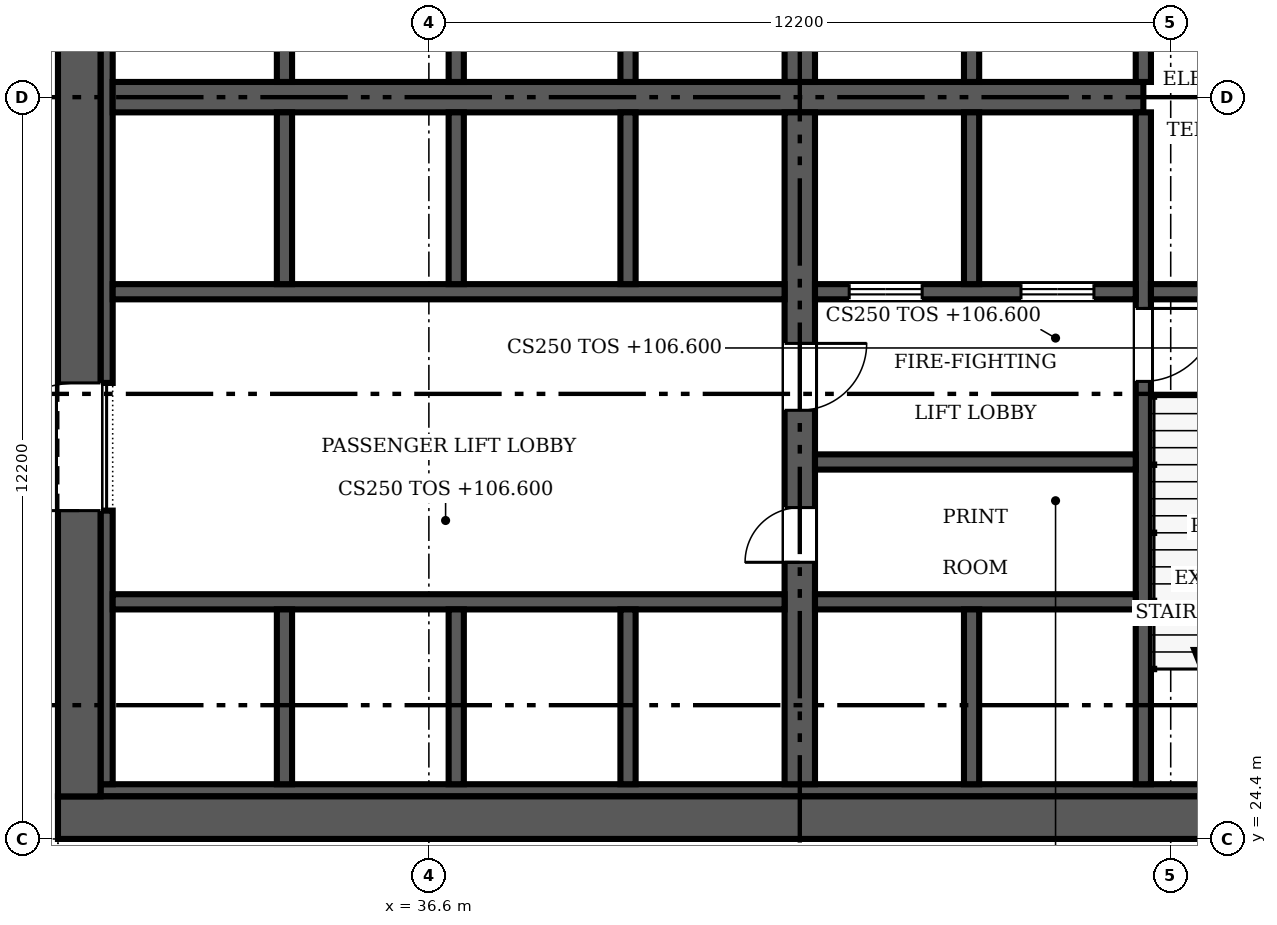
"""IFC4 building model, lengths in metres.
Left out: names, types, materials, properties, quantities, classifications, styles, units other than length and angle.
Written with IfcOpenShell. Run it as: python <this file> out.ifc"""

import sys

from ifc_helpers import new_model, si_unit, direction, frame, frame_2d, origin, place, context, subcontext, project, spatial, rectangle, extrude, source, transform, mapped, element, fill, save


model = new_model("IFC4")
c1 = context("Model", 3, precision=1e-05, world=origin(), true_north=direction((0.0, 1.0)))
c2 = subcontext(c1, "Body", "Model", "MODEL_VIEW")
j1 = project(units=[si_unit("LENGTHUNIT", "METRE"), si_unit("PLANEANGLEUNIT", "RADIAN")], contexts=[c1])
p1 = place(None, origin())
s1 = spatial("IfcSite", under=j1, at=p1, CompositionType="ELEMENT")
p2 = place(p1, origin())
s2 = spatial("IfcBuilding", under=s1, at=p2, CompositionType="ELEMENT")
p3 = place(p2, frame((0.0, 0.0, 106.6)))
s3 = spatial("IfcBuildingStorey", under=s2, at=p3, CompositionType="ELEMENT", Elevation=106.6)
p4 = place(p3, frame((54.9, 24.75, 0.0), z_axis=(0.0, 0.0, 1.0), x_axis=(-1.0, 0.0, 0.0)))
e1 = element("IfcWall", 1, at=p4, inside=s3, PredefinedType="SHEAR", context=c2, shape_type="SweptSolid", body=[
    extrude(rectangle(XDim=24.4, YDim=0.7, at=frame_2d((12.2, 0.0))), origin(), (0.0, 0.0, 1.0), 6.0),
])
m1 = source(origin(), c2, "Body", "SweptSolid", [
    extrude(rectangle(XDim=1.2, YDim=2.1, at=frame_2d((0.6, 1.05))), frame((0.0, 0.36, 0.0), z_axis=(0.0, -1.0, 0.0), x_axis=(1.0, 0.0, 0.0)), (0.0, 0.0, 1.0), 0.72),
])
p5 = place(p4, frame((1.5, 0.0, 0.0)))
e2 = element("IfcOpeningElement", 2, at=p5, cuts=e1, PredefinedType="OPENING", context=c2, shape_type="MappedRepresentation", body=[
    mapped(m1, transform((0.0, 0.0, 0.0), scale=1.0)),
])
p6 = place(p3, frame((30.85, 25.1, 0.0), z_axis=(0.0, 0.0, 1.0), x_axis=(0.0, 1.0, 0.0)))
e3 = element("IfcWall", 3, at=p6, inside=s3, PredefinedType="SHEAR", context=c2, shape_type="SweptSolid", body=[
    extrude(rectangle(XDim=23.0, YDim=0.7, at=frame_2d((11.5, 0.0))), origin(), (0.0, 0.0, 1.0), 6.0),
])
m2 = source(origin(), c2, "Body", "SweptSolid", [
    extrude(rectangle(XDim=2.1, YDim=2.4, at=frame_2d((1.05, 1.2))), frame((0.0, 0.36, 0.0), z_axis=(0.0, -1.0, 0.0), x_axis=(1.0, 0.0, 0.0)), (0.0, 0.0, 1.0), 0.72),
])
p7 = place(p6, frame((4.7, 0.0, 0.0)))
e4 = element("IfcOpeningElement", 4, at=p7, cuts=e3, PredefinedType="OPENING", context=c2, shape_type="MappedRepresentation", body=[
    mapped(m2, transform((0.0, 0.0, 0.0), scale=1.0)),
])
p8 = place(p6, frame((16.2, 0.0, 0.0)))
e5 = element("IfcOpeningElement", 5, at=p8, cuts=e3, PredefinedType="OPENING", context=c2, shape_type="MappedRepresentation", body=[
    mapped(m2, transform((0.0, 0.0, 0.0), scale=1.0)),
])
p9 = place(p3, frame((31.2, 25.2, 0.0), z_axis=(0.0, 0.0, 1.0), x_axis=(1.0, 0.0, 0.0)))
e6 = element("IfcWall", 6, at=p9, inside=s3, PredefinedType="SOLIDWALL", context=c2, shape_type="SweptSolid", body=[
    extrude(rectangle(XDim=21.0, YDim=0.2, at=frame_2d((10.5, 0.0))), origin(), (0.0, 0.0, 1.0), 6.0),
])
p10 = place(p3, frame((31.3, 25.3, 0.0), z_axis=(0.0, 0.0, 1.0), x_axis=(0.0, 1.0, 0.0)))
e7 = element("IfcWall", 7, at=p10, inside=s3, PredefinedType="SOLIDWALL", context=c2, shape_type="SweptSolid", body=[
    extrude(rectangle(XDim=4.5, YDim=0.2, at=frame_2d((2.25, 0.0))), origin(), (0.0, 0.0, 1.0), 6.0),
])
p11 = place(p3, frame((31.3, 31.9, 0.0), z_axis=(0.0, 0.0, 1.0), x_axis=(0.0, 1.0, 0.0)))
e8 = element("IfcWall", 8, at=p11, inside=s3, PredefinedType="SOLIDWALL", context=c2, shape_type="SweptSolid", body=[
    extrude(rectangle(XDim=9.4, YDim=0.2, at=frame_2d((4.7, 0.0))), origin(), (0.0, 0.0, 1.0), 6.0),
])
p12 = place(p3, frame((31.4, 36.6, 0.0), z_axis=(0.0, 0.0, 1.0), x_axis=(1.0, 0.0, 0.0)))
e9 = element("IfcWall", 9, at=p12, inside=s3, PredefinedType="SHEAR", context=c2, shape_type="SweptSolid", body=[
    extrude(rectangle(XDim=16.95, YDim=0.5, at=frame_2d((8.475, 0.0))), origin(), (0.0, 0.0, 1.0), 6.0),
])
p13 = place(p3, frame((42.7, 36.35, 0.0), z_axis=(0.0, 0.0, 1.0), x_axis=(0.0, -1.0, 0.0)))
e10 = element("IfcWall", 10, at=p13, inside=s3, PredefinedType="SHEAR", context=c2, shape_type="SweptSolid", body=[
    extrude(rectangle(XDim=11.05, YDim=0.5, at=frame_2d((5.525, 0.0))), origin(), (0.0, 0.0, 1.0), 6.0),
])
m3 = source(origin(), c2, "Body", "SweptSolid", [
    extrude(rectangle(XDim=0.9, YDim=2.1, at=frame_2d((0.45, 1.05))), frame((0.0, 0.26, 0.0), z_axis=(0.0, -1.0, 0.0), x_axis=(1.0, 0.0, 0.0)), (0.0, 0.0, 1.0), 0.52),
])
p14 = place(p13, frame((6.5, 0.0, 0.0)))
e11 = element("IfcOpeningElement", 11, at=p14, cuts=e10, PredefinedType="OPENING", context=c2, shape_type="MappedRepresentation", body=[
    mapped(m3, transform((0.0, 0.0, 0.0), scale=1.0)),
])
m4 = source(origin(), c2, "Body", "SweptSolid", [
    extrude(rectangle(XDim=1.1, YDim=2.1, at=frame_2d((0.55, 1.05))), frame((0.0, 0.26, 0.0), z_axis=(0.0, -1.0, 0.0), x_axis=(1.0, 0.0, 0.0)), (0.0, 0.0, 1.0), 0.52),
])
p15 = place(p13, frame((3.8, 0.0, 0.0)))
e12 = element("IfcOpeningElement", 12, at=p15, cuts=e10, PredefinedType="OPENING", context=c2, shape_type="MappedRepresentation", body=[
    mapped(m4, transform((0.0, 0.0, 0.0), scale=1.0)),
])
p16 = place(p3, frame((42.7, 36.85, 0.0), z_axis=(0.0, 0.0, 1.0), x_axis=(0.0, 1.0, 0.0)))
e13 = element("IfcWall", 13, at=p16, inside=s3, PredefinedType="SHEAR", context=c2, shape_type="SweptSolid", body=[
    extrude(rectangle(XDim=2.95, YDim=0.5, at=frame_2d((1.475, 0.0))), origin(), (0.0, 0.0, 1.0), 6.0),
])
p17 = place(p3, frame((48.35, 36.35, 0.0), z_axis=(0.0, 0.0, 1.0), x_axis=(0.0, -1.0, 0.0)))
e14 = element("IfcWall", 14, at=p17, inside=s3, PredefinedType="SOLIDWALL", context=c2, shape_type="SweptSolid", body=[
    extrude(rectangle(XDim=11.05, YDim=0.25, at=frame_2d((5.525, 0.0))), origin(), (0.0, 0.0, 1.0), 6.0),
])
m5 = source(origin(), c2, "Body", "SweptSolid", [
    extrude(rectangle(XDim=1.2, YDim=2.1, at=frame_2d((0.6, 1.05))), frame((0.0, 0.135, 0.0), z_axis=(0.0, -1.0, 0.0), x_axis=(1.0, 0.0, 0.0)), (0.0, 0.0, 1.0), 0.27),
])
p18 = place(p17, frame((3.225, 0.0, 0.0)))
e15 = element("IfcOpeningElement", 15, at=p18, cuts=e14, PredefinedType="OPENING", context=c2, shape_type="MappedRepresentation", body=[
    mapped(m5, transform((0.0, 0.0, 0.0), scale=1.0)),
])
p19 = place(p3, frame((48.35, 47.9, 0.0), z_axis=(0.0, 0.0, 1.0), x_axis=(0.0, -1.0, 0.0)))
e16 = element("IfcWall", 16, at=p19, inside=s3, PredefinedType="SOLIDWALL", context=c2, shape_type="SweptSolid", body=[
    extrude(rectangle(XDim=11.05, YDim=0.25, at=frame_2d((5.525, 0.0))), origin(), (0.0, 0.0, 1.0), 6.0),
])
p20 = place(p19, frame((6.625, 0.0, 0.0)))
e17 = element("IfcOpeningElement", 17, at=p20, cuts=e16, PredefinedType="OPENING", context=c2, shape_type="MappedRepresentation", body=[
    mapped(m5, transform((0.0, 0.0, 0.0), scale=1.0)),
])
p21 = place(p3, frame((31.4, 33.4, 0.0), z_axis=(0.0, 0.0, 1.0), x_axis=(1.0, 0.0, 0.0)))
e18 = element("IfcWall", 18, at=p21, inside=s3, PredefinedType="SOLIDWALL", context=c2, shape_type="SweptSolid", body=[
    extrude(rectangle(XDim=11.05, YDim=0.25, at=frame_2d((5.525, 0.0))), origin(), (0.0, 0.0, 1.0), 5.8),
])
p22 = place(p3, frame((48.225, 33.4, 0.0), z_axis=(0.0, 0.0, 1.0), x_axis=(-1.0, 0.0, 0.0)))
e19 = element("IfcWall", 19, at=p22, inside=s3, PredefinedType="SOLIDWALL", context=c2, shape_type="SweptSolid", body=[
    extrude(rectangle(XDim=5.275, YDim=0.25, at=frame_2d((2.638, 0.0))), origin(), (0.0, 0.0, 1.0), 6.0),
])
p23 = place(p22, frame((3.512, 0.0, 0.0)))
e20 = element("IfcOpeningElement", 20, at=p23, cuts=e19, PredefinedType="OPENING", context=c2, shape_type="MappedRepresentation", body=[
    mapped(m5, transform((0.0, 0.0, 0.0), scale=1.0)),
])
p24 = place(p22, frame((0.688, 0.0, 0.0)))
e21 = element("IfcOpeningElement", 21, at=p24, cuts=e19, PredefinedType="OPENING", context=c2, shape_type="MappedRepresentation", body=[
    mapped(m5, transform((0.0, 0.0, 0.0), scale=1.0)),
])
p25 = place(p3, frame((48.475, 33.4, 0.0), z_axis=(0.0, 0.0, 1.0), x_axis=(1.0, 0.0, 0.0)))
e22 = element("IfcWall", 22, at=p25, inside=s3, PredefinedType="SOLIDWALL", context=c2, shape_type="SweptSolid", body=[
    extrude(rectangle(XDim=3.525, YDim=0.25, at=frame_2d((1.762, 0.0))), origin(), (0.0, 0.0, 1.0), 6.0),
])
p26 = place(p3, frame((31.4, 28.3, 0.0), z_axis=(0.0, 0.0, 1.0), x_axis=(1.0, 0.0, 0.0)))
e23 = element("IfcWall", 23, at=p26, inside=s3, PredefinedType="SOLIDWALL", context=c2, shape_type="SweptSolid", body=[
    extrude(rectangle(XDim=11.05, YDim=0.25, at=frame_2d((5.525, 0.0))), origin(), (0.0, 0.0, 1.0), 5.8),
])
p27 = place(p3, frame((42.95, 28.3, 0.0), z_axis=(0.0, 0.0, 1.0), x_axis=(1.0, 0.0, 0.0)))
e24 = element("IfcWall", 24, at=p27, inside=s3, PredefinedType="SOLIDWALL", context=c2, shape_type="SweptSolid", body=[
    extrude(rectangle(XDim=5.275, YDim=0.25, at=frame_2d((2.638, 0.0))), origin(), (0.0, 0.0, 1.0), 6.0),
])
p28 = place(p3, frame((34.225, 33.525, 0.0), z_axis=(0.0, 0.0, 1.0), x_axis=(0.0, 1.0, 0.0)))
e25 = element("IfcWall", 25, at=p28, inside=s3, PredefinedType="SOLIDWALL", context=c2, shape_type="SweptSolid", body=[
    extrude(rectangle(XDim=2.825, YDim=0.25, at=frame_2d((1.413, 0.0))), origin(), (0.0, 0.0, 1.0), 5.8),
])
p29 = place(p3, frame((34.225, 36.85, 0.0), z_axis=(0.0, 0.0, 1.0), x_axis=(0.0, 1.0, 0.0)))
e26 = element("IfcWall", 26, at=p29, inside=s3, PredefinedType="SOLIDWALL", context=c2, shape_type="SweptSolid", body=[
    extrude(rectangle(XDim=2.825, YDim=0.25, at=frame_2d((1.413, 0.0))), origin(), (0.0, 0.0, 1.0), 6.0),
])
p30 = place(p3, frame((37.05, 33.525, 0.0), z_axis=(0.0, 0.0, 1.0), x_axis=(0.0, 1.0, 0.0)))
e27 = element("IfcWall", 27, at=p30, inside=s3, PredefinedType="SOLIDWALL", context=c2, shape_type="SweptSolid", body=[
    extrude(rectangle(XDim=2.825, YDim=0.25, at=frame_2d((1.413, 0.0))), origin(), (0.0, 0.0, 1.0), 5.8),
])
p31 = place(p3, frame((37.05, 36.85, 0.0), z_axis=(0.0, 0.0, 1.0), x_axis=(0.0, 1.0, 0.0)))
e28 = element("IfcWall", 28, at=p31, inside=s3, PredefinedType="SOLIDWALL", context=c2, shape_type="SweptSolid", body=[
    extrude(rectangle(XDim=2.825, YDim=0.25, at=frame_2d((1.413, 0.0))), origin(), (0.0, 0.0, 1.0), 6.0),
])
p32 = place(p3, frame((39.875, 33.525, 0.0), z_axis=(0.0, 0.0, 1.0), x_axis=(0.0, 1.0, 0.0)))
e29 = element("IfcWall", 29, at=p32, inside=s3, PredefinedType="SOLIDWALL", context=c2, shape_type="SweptSolid", body=[
    extrude(rectangle(XDim=2.825, YDim=0.25, at=frame_2d((1.413, 0.0))), origin(), (0.0, 0.0, 1.0), 5.8),
])
p33 = place(p3, frame((39.875, 36.85, 0.0), z_axis=(0.0, 0.0, 1.0), x_axis=(0.0, 1.0, 0.0)))
e30 = element("IfcWall", 30, at=p33, inside=s3, PredefinedType="SOLIDWALL", context=c2, shape_type="SweptSolid", body=[
    extrude(rectangle(XDim=2.825, YDim=0.25, at=frame_2d((1.413, 0.0))), origin(), (0.0, 0.0, 1.0), 6.0),
])
p34 = place(p3, frame((45.525, 33.525, 0.0), z_axis=(0.0, 0.0, 1.0), x_axis=(0.0, 1.0, 0.0)))
e31 = element("IfcWall", 31, at=p34, inside=s3, PredefinedType="SOLIDWALL", context=c2, shape_type="SweptSolid", body=[
    extrude(rectangle(XDim=2.825, YDim=0.25, at=frame_2d((1.413, 0.0))), origin(), (0.0, 0.0, 1.0), 6.0),
])
p35 = place(p3, frame((45.525, 36.85, 0.0), z_axis=(0.0, 0.0, 1.0), x_axis=(0.0, 1.0, 0.0)))
e32 = element("IfcWall", 32, at=p35, inside=s3, PredefinedType="SOLIDWALL", context=c2, shape_type="SweptSolid", body=[
    extrude(rectangle(XDim=2.825, YDim=0.25, at=frame_2d((1.413, 0.0))), origin(), (0.0, 0.0, 1.0), 6.0),
])
p36 = place(p3, frame((42.95, 30.6, 0.0), z_axis=(0.0, 0.0, 1.0), x_axis=(1.0, 0.0, 0.0)))
e33 = element("IfcWall", 33, at=p36, inside=s3, PredefinedType="SOLIDWALL", context=c2, shape_type="SweptSolid", body=[
    extrude(rectangle(XDim=5.275, YDim=0.25, at=frame_2d((2.638, 0.0))), origin(), (0.0, 0.0, 1.0), 6.0),
])
for number, where, z_axis, x_axis in (
    (34, (34.225, 25.3, 0.0), (0.0, 0.0, 1.0), (0.0, 1.0, 0.0)),
    (35, (37.05, 25.3, 0.0), (0.0, 0.0, 1.0), (0.0, 1.0, 0.0)),
    (36, (39.875, 25.3, 0.0), (0.0, 0.0, 1.0), (0.0, 1.0, 0.0)),
):
    element("IfcWall", number, at=place(p3, frame(where, z_axis=z_axis, x_axis=x_axis)), inside=s3, PredefinedType="SOLIDWALL", context=c2, shape_type="SweptSolid", body=[
        extrude(rectangle(XDim=2.875, YDim=0.25, at=frame_2d((1.438, 0.0))), origin(), (0.0, 0.0, 1.0), 5.8),
    ])
p37 = place(p3, frame((45.525, 25.3, 0.0), z_axis=(0.0, 0.0, 1.0), x_axis=(0.0, 1.0, 0.0)))
e37 = element("IfcWall", 37, at=p37, inside=s3, PredefinedType="SOLIDWALL", context=c2, shape_type="SweptSolid", body=[
    extrude(rectangle(XDim=2.875, YDim=0.25, at=frame_2d((1.438, 0.0))), origin(), (0.0, 0.0, 1.0), 6.0),
])
m6 = source(origin(), c2, "Body", "SweptSolid", [
    extrude(rectangle(XDim=2.1, YDim=2.4, at=frame_2d((1.05, 1.2))), frame((0.0, 0.025, 0.0), z_axis=(0.0, -1.0, 0.0), x_axis=(1.0, 0.0, 0.0)), (0.0, 0.0, 1.0), 0.05),
])
p38 = place(p7, origin())
e38 = element("IfcDoor", 38, at=p38, inside=s3, OperationType="DOUBLE_DOOR_SINGLE_SWING", PredefinedType="DOOR", context=c2, shape_type="MappedRepresentation", body=[
    mapped(m6, transform((0.0, 0.0, 0.0), scale=1.0)),
])
fill(e4, e38)
m7 = source(origin(), c2, "Body", "SweptSolid", [
    extrude(rectangle(XDim=0.9, YDim=2.1, at=frame_2d((0.45, 1.05))), frame((0.0, 0.025, 0.0), z_axis=(0.0, -1.0, 0.0), x_axis=(1.0, 0.0, 0.0)), (0.0, 0.0, 1.0), 0.05),
])
p39 = place(p14, origin())
e39 = element("IfcDoor", 39, at=p39, inside=s3, OperationType="SINGLE_SWING_RIGHT", PredefinedType="DOOR", context=c2, shape_type="MappedRepresentation", body=[
    mapped(m7, transform((0.0, 0.0, 0.0), scale=1.0)),
])
fill(e11, e39)
m8 = source(origin(), c2, "Body", "SweptSolid", [
    extrude(rectangle(XDim=1.1, YDim=2.1, at=frame_2d((0.55, 1.05))), frame((0.0, 0.025, 0.0), z_axis=(0.0, -1.0, 0.0), x_axis=(1.0, 0.0, 0.0)), (0.0, 0.0, 1.0), 0.05),
])
p40 = place(p15, origin())
e40 = element("IfcDoor", 40, at=p40, inside=s3, OperationType="SINGLE_SWING_LEFT", PredefinedType="DOOR", context=c2, shape_type="MappedRepresentation", body=[
    mapped(m8, transform((0.0, 0.0, 0.0), scale=1.0)),
])
fill(e12, e40)
m9 = source(origin(), c2, "Body", "SweptSolid", [
    extrude(rectangle(XDim=1.2, YDim=2.1, at=frame_2d((0.6, 1.05))), frame((0.0, 0.025, 0.0), z_axis=(0.0, -1.0, 0.0), x_axis=(1.0, 0.0, 0.0)), (0.0, 0.0, 1.0), 0.05),
])
p41 = place(p18, origin())
e41 = element("IfcDoor", 41, at=p41, inside=s3, OperationType="SINGLE_SWING_LEFT", PredefinedType="DOOR", context=c2, shape_type="MappedRepresentation", body=[
    mapped(m9, transform((0.0, 0.0, 0.0), scale=1.0)),
])
fill(e15, e41)
p42 = place(p23, origin())
e42 = element("IfcDoor", 42, at=p42, inside=s3, OperationType="DOUBLE_DOOR_SLIDING", PredefinedType="DOOR", context=c2, shape_type="MappedRepresentation", body=[
    mapped(m9, transform((0.0, 0.0, 0.0), scale=1.0)),
])
fill(e20, e42)
p43 = place(p24, origin())
e43 = element("IfcDoor", 43, at=p43, inside=s3, OperationType="DOUBLE_DOOR_SLIDING", PredefinedType="DOOR", context=c2, shape_type="MappedRepresentation", body=[
    mapped(m9, transform((0.0, 0.0, 0.0), scale=1.0)),
])
fill(e21, e43)
save(model, sys.argv[1])
